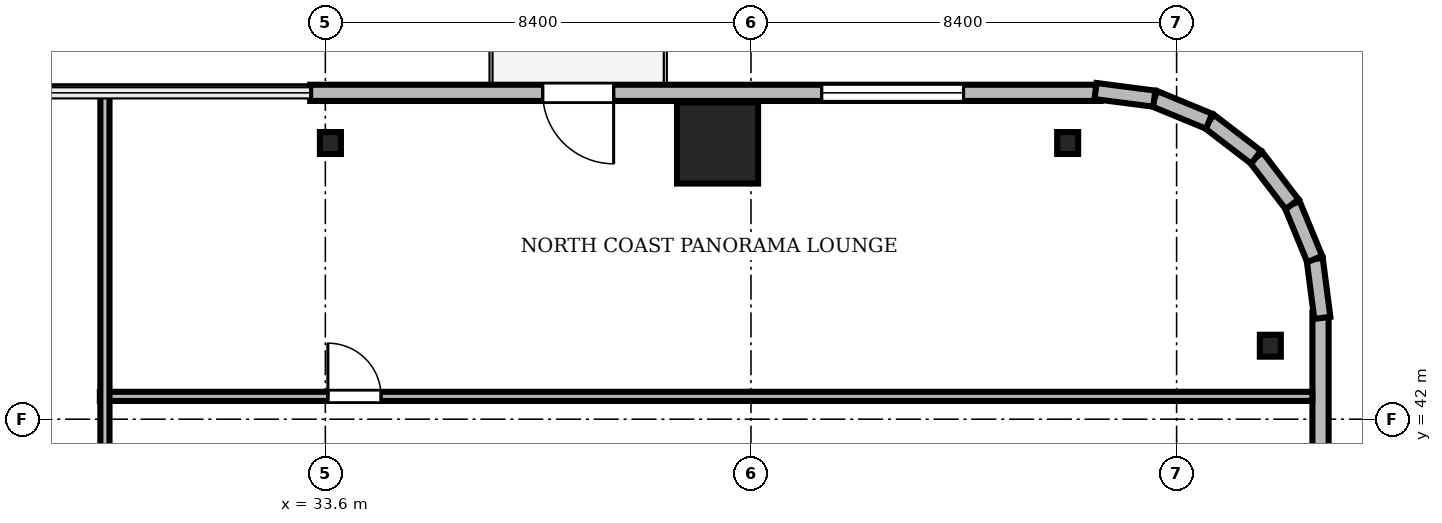
"""IFC4 building model, lengths in metres.
Left out: names, types, materials, properties, quantities, classifications, styles, units other than length and angle.
Written with IfcOpenShell. Run it as: python <this file> out.ifc"""

import sys

from ifc_helpers import new_model, si_unit, direction, frame, frame_2d, origin, origin_2d, place, context, subcontext, project, spatial, rectangle, i_section, extrude, source, transform, mapped, element, fill, save


model = new_model("IFC4")
c1 = context("Model", 3, precision=1e-05, world=origin(), true_north=direction((0.0, 1.0)))
c2 = subcontext(c1, "Body", "Model", "MODEL_VIEW")
j1 = project(units=[si_unit("LENGTHUNIT", "METRE"), si_unit("PLANEANGLEUNIT", "RADIAN")], contexts=[c1])
p1 = place(None, origin())
s1 = spatial("IfcSite", under=j1, at=p1, CompositionType="ELEMENT")
p2 = place(p1, origin())
s2 = spatial("IfcBuilding", under=s1, at=p2, CompositionType="ELEMENT")
p3 = place(p2, frame((0.0, 0.0, 118.7)))
s3 = spatial("IfcBuildingStorey", under=s2, at=p3, CompositionType="ELEMENT", Elevation=118.7)
m1 = source(origin(), c2, "Body", "SweptSolid", [
    extrude(rectangle(XDim=1.6, YDim=1.6, at=origin_2d()), origin(), (0.0, 0.0, 1.0), 3.46),
])
p4 = place(p3, frame((41.34, 47.45, 0.0), z_axis=(0.0, 0.0, 1.0), x_axis=(1.0, 0.0, 0.0)))
e1 = element("IfcColumn", 1, at=p4, inside=s3, PredefinedType="COLUMN", context=c2, shape_type="MappedRepresentation", body=[
    mapped(m1, transform((0.0, 0.0, 0.0), scale=1.0)),
])
m2 = source(origin(), c2, "Body", "SweptSolid", [
    extrude(i_section(OverallWidth=0.414, OverallDepth=0.432, WebThickness=0.026, FlangeThickness=0.04, FilletRadius=0.015, at=origin_2d()), origin(), (0.0, 0.0, 1.0), 3.46),
])
for number, where, z_axis, x_axis in (
    (2, (52.25, 43.45, 0.0), (0.0, 0.0, 1.0), (1.0, 0.0, 0.0)),
    (3, (48.25, 47.45, 0.0), (0.0, 0.0, 1.0), (1.0, 0.0, 0.0)),
    (4, (33.7, 47.45, 0.0), (0.0, 0.0, 1.0), (1.0, 0.0, 0.0)),
):
    element("IfcColumn", number, at=place(p3, frame(where, z_axis=z_axis, x_axis=x_axis)), inside=s3, PredefinedType="COLUMN", context=c2, shape_type="MappedRepresentation", body=[
        mapped(m2, transform((0.0, 0.0, 0.0), scale=1.0)),
    ])
m3 = source(origin(), c2, "Body", "SweptSolid", [
    extrude(rectangle(XDim=15.6, YDim=0.32, at=frame_2d((7.8, 0.0))), origin(), (0.0, 0.0, 1.0), 3.46),
])
p5 = place(p3, frame((48.9, 48.44, 0.0), z_axis=(0.0, 0.0, 1.0), x_axis=(-1.0, 0.0, 0.0)))
e5 = element("IfcWall", 5, at=p5, inside=s3, PredefinedType="SOLIDWALL", context=c2, shape_type="MappedRepresentation", body=[
    mapped(m3, transform((0.0, 0.0, 0.0), scale=1.0)),
])
m4 = source(origin(), c2, "Body", "SweptSolid", [
    extrude(rectangle(XDim=1.4, YDim=2.3, at=frame_2d((0.7, 1.15))), frame((0.0, 0.17, 0.0), z_axis=(0.0, -1.0, 0.0), x_axis=(1.0, 0.0, 0.0)), (0.0, 0.0, 1.0), 0.34),
])
p6 = place(p5, frame((9.61, 0.0, 0.0)))
e6 = element("IfcOpeningElement", 6, at=p6, cuts=e5, PredefinedType="OPENING", context=c2, shape_type="MappedRepresentation", body=[
    mapped(m4, transform((0.0, 0.0, 0.0), scale=1.0)),
])
m5 = source(origin(), c2, "Body", "SweptSolid", [
    extrude(rectangle(XDim=2.8, YDim=2.4, at=frame_2d((1.4, 1.2))), frame((0.0, 0.17, 0.0), z_axis=(0.0, -1.0, 0.0), x_axis=(1.0, 0.0, 0.0)), (0.0, 0.0, 1.0), 0.34),
])
p7 = place(p5, frame((2.705, 0.0, 0.72)))
e7 = element("IfcOpeningElement", 7, at=p7, cuts=e5, PredefinedType="OPENING", context=c2, shape_type="MappedRepresentation", body=[
    mapped(m5, transform((0.0, 0.0, 0.0), scale=1.0)),
])
m6 = source(origin(), c2, "Body", "SweptSolid", [
    extrude(rectangle(XDim=15.6, YDim=0.32, at=frame_2d((7.8, 0.0))), origin(), (0.0, 0.0, 1.0), 3.46),
])
p8 = place(p3, frame((53.24, 28.5, 0.0), z_axis=(0.0, 0.0, 1.0), x_axis=(0.0, 1.0, 0.0)))
e8 = element("IfcWall", 8, at=p8, inside=s3, PredefinedType="SOLIDWALL", context=c2, shape_type="MappedRepresentation", body=[
    mapped(m6, transform((0.0, 0.0, 0.0), scale=1.0)),
])
p9 = place(p8, frame((10.095, 0.0, 0.72)))
e9 = element("IfcOpeningElement", 9, at=p9, cuts=e8, PredefinedType="OPENING", context=c2, shape_type="MappedRepresentation", body=[
    mapped(m5, transform((0.0, 0.0, 0.0), scale=1.0)),
])
m7 = source(origin(), c2, "Body", "SweptSolid", [
    extrude(rectangle(XDim=1.17, YDim=0.32, at=frame_2d((0.585, 0.0))), origin(), (0.0, 0.0, 1.0), 3.46),
])
p10 = place(p3, frame((53.276, 44.0, 0.0), z_axis=(0.0, 0.0, 1.0), x_axis=(-0.128295670475, 0.991735963317, 0.0)))
e10 = element("IfcWall", 10, at=p10, inside=s3, PredefinedType="SOLIDWALL", context=c2, shape_type="MappedRepresentation", body=[
    mapped(m7, transform((0.0, 0.0, 0.0), scale=1.0)),
])
m8 = source(origin(), c2, "Body", "SweptSolid", [
    extrude(rectangle(XDim=1.169, YDim=0.32, at=frame_2d((0.584, 0.0))), origin(), (0.0, 0.0, 1.0), 3.46),
])
p11 = place(p3, frame((53.125, 45.16, 0.0), z_axis=(0.0, 0.0, 1.0), x_axis=(-0.381054331552, 0.924552646638, 0.0)))
e11 = element("IfcWall", 11, at=p11, inside=s3, PredefinedType="SOLIDWALL", context=c2, shape_type="MappedRepresentation", body=[
    mapped(m8, transform((0.0, 0.0, 0.0), scale=1.0)),
])
m9 = source(origin(), c2, "Body", "SweptSolid", [
    extrude(rectangle(XDim=1.169, YDim=0.32, at=frame_2d((0.584, 0.0))), origin(), (0.0, 0.0, 1.0), 3.46),
])
p12 = place(p3, frame((52.68, 46.241, 0.0), z_axis=(0.0, 0.0, 1.0), x_axis=(-0.608387696831, 0.793639975269, 0.0)))
e12 = element("IfcWall", 12, at=p12, inside=s3, PredefinedType="SOLIDWALL", context=c2, shape_type="MappedRepresentation", body=[
    mapped(m9, transform((0.0, 0.0, 0.0), scale=1.0)),
])
m10 = source(origin(), c2, "Body", "SweptSolid", [
    extrude(rectangle(XDim=1.169, YDim=0.32, at=frame_2d((0.584, 0.0))), origin(), (0.0, 0.0, 1.0), 3.46),
])
p13 = place(p3, frame((51.969, 47.169, 0.0), z_axis=(0.0, 0.0, 1.0), x_axis=(-0.793663520347, 0.608356981114, 0.0)))
e13 = element("IfcWall", 13, at=p13, inside=s3, PredefinedType="SOLIDWALL", context=c2, shape_type="MappedRepresentation", body=[
    mapped(m10, transform((0.0, 0.0, 0.0), scale=1.0)),
])
p14 = place(p3, frame((51.041, 47.88, 0.0), z_axis=(0.0, 0.0, 1.0), x_axis=(-0.924552646638, 0.381054331552, 0.0)))
e14 = element("IfcWall", 14, at=p14, inside=s3, PredefinedType="SOLIDWALL", context=c2, shape_type="MappedRepresentation", body=[
    mapped(m8, transform((0.0, 0.0, 0.0), scale=1.0)),
])
p15 = place(p3, frame((49.96, 48.325, 0.0), z_axis=(0.0, 0.0, 1.0), x_axis=(-0.991735963317, 0.128295670475, 0.0)))
e15 = element("IfcWall", 15, at=p15, inside=s3, PredefinedType="SOLIDWALL", context=c2, shape_type="MappedRepresentation", body=[
    mapped(m7, transform((0.0, 0.0, 0.0), scale=1.0)),
])
m11 = source(origin(), c2, "Body", "SweptSolid", [
    extrude(rectangle(XDim=23.928, YDim=0.18, at=frame_2d((11.964, 0.0))), origin(), (0.0, 0.0, 1.0), 2.702),
])
p16 = place(p3, frame((29.15, 42.45, 0.0), z_axis=(0.0, 0.0, 1.0), x_axis=(1.0, 0.0, 0.0)))
e16 = element("IfcWall", 16, at=p16, inside=s3, PredefinedType="PARTITIONING", context=c2, shape_type="MappedRepresentation", body=[
    mapped(m11, transform((0.0, 0.0, 0.0), scale=1.0)),
])
m12 = source(origin(), c2, "Body", "SweptSolid", [
    extrude(rectangle(XDim=1.05, YDim=2.2, at=frame_2d((0.525, 1.1))), frame((0.0, 0.1, 0.0), z_axis=(0.0, -1.0, 0.0), x_axis=(1.0, 0.0, 0.0)), (0.0, 0.0, 1.0), 0.2),
])
p17 = place(p16, frame((4.5, 0.0, 0.0)))
e17 = element("IfcOpeningElement", 17, at=p17, cuts=e16, PredefinedType="OPENING", context=c2, shape_type="MappedRepresentation", body=[
    mapped(m12, transform((0.0, 0.0, 0.0), scale=1.0)),
])
m13 = source(origin(), c2, "Body", "SweptSolid", [
    extrude(rectangle(XDim=11.45, YDim=0.18, at=frame_2d((5.725, 0.0))), origin(), (0.0, 0.0, 1.0), 2.702),
])
p18 = place(p3, frame((29.25, 37.02, 0.0), z_axis=(0.0, 0.0, 1.0), x_axis=(0.0, 1.0, 0.0)))
e18 = element("IfcWall", 18, at=p18, inside=s3, PredefinedType="PARTITIONING", context=c2, shape_type="MappedRepresentation", body=[
    mapped(m13, transform((0.0, 0.0, 0.0), scale=1.0)),
])
m14 = source(origin(), c2, "Body", "SweptSolid", [
    extrude(rectangle(XDim=1.4, YDim=2.3, at=frame_2d((0.7, 1.15))), frame((0.0, 0.025, 0.0), z_axis=(0.0, -1.0, 0.0), x_axis=(1.0, 0.0, 0.0)), (0.0, 0.0, 1.0), 0.05),
])
p19 = place(p6, frame((1.4, 0.0, 0.0), z_axis=(0.0, 0.0, 1.0), x_axis=(-1.0, 0.0, 0.0)))
e19 = element("IfcDoor", 19, at=p19, inside=s3, OperationType="DOUBLE_DOOR_SLIDING", PredefinedType="DOOR", context=c2, shape_type="MappedRepresentation", body=[
    mapped(m14, transform((0.0, 0.0, 0.0), scale=1.0)),
])
fill(e6, e19)
m15 = source(origin(), c2, "Body", "SweptSolid", [
    extrude(rectangle(XDim=2.8, YDim=2.4, at=frame_2d((1.4, 1.2))), frame((0.0, 0.03, 0.0), z_axis=(0.0, -1.0, 0.0), x_axis=(1.0, 0.0, 0.0)), (0.0, 0.0, 1.0), 0.06),
])
p20 = place(p7, origin())
e20 = element("IfcWindow", 20, at=p20, inside=s3, PartitioningType="SINGLE_PANEL", PredefinedType="WINDOW", context=c2, shape_type="MappedRepresentation", body=[
    mapped(m15, transform((0.0, 0.0, 0.0), scale=1.0)),
])
fill(e7, e20)
m16 = source(origin(), c2, "Body", "SweptSolid", [
    extrude(rectangle(XDim=1.05, YDim=2.2, at=frame_2d((0.525, 1.1))), frame((0.0, 0.025, 0.0), z_axis=(0.0, -1.0, 0.0), x_axis=(1.0, 0.0, 0.0)), (0.0, 0.0, 1.0), 0.05),
])
p21 = place(p17, origin())
e21 = element("IfcDoor", 21, at=p21, inside=s3, OperationType="SINGLE_SWING_LEFT", PredefinedType="DOOR", context=c2, shape_type="MappedRepresentation", body=[
    mapped(m16, transform((0.0, 0.0, 0.0), scale=1.0)),
])
fill(e17, e21)
save(model, sys.argv[1])
